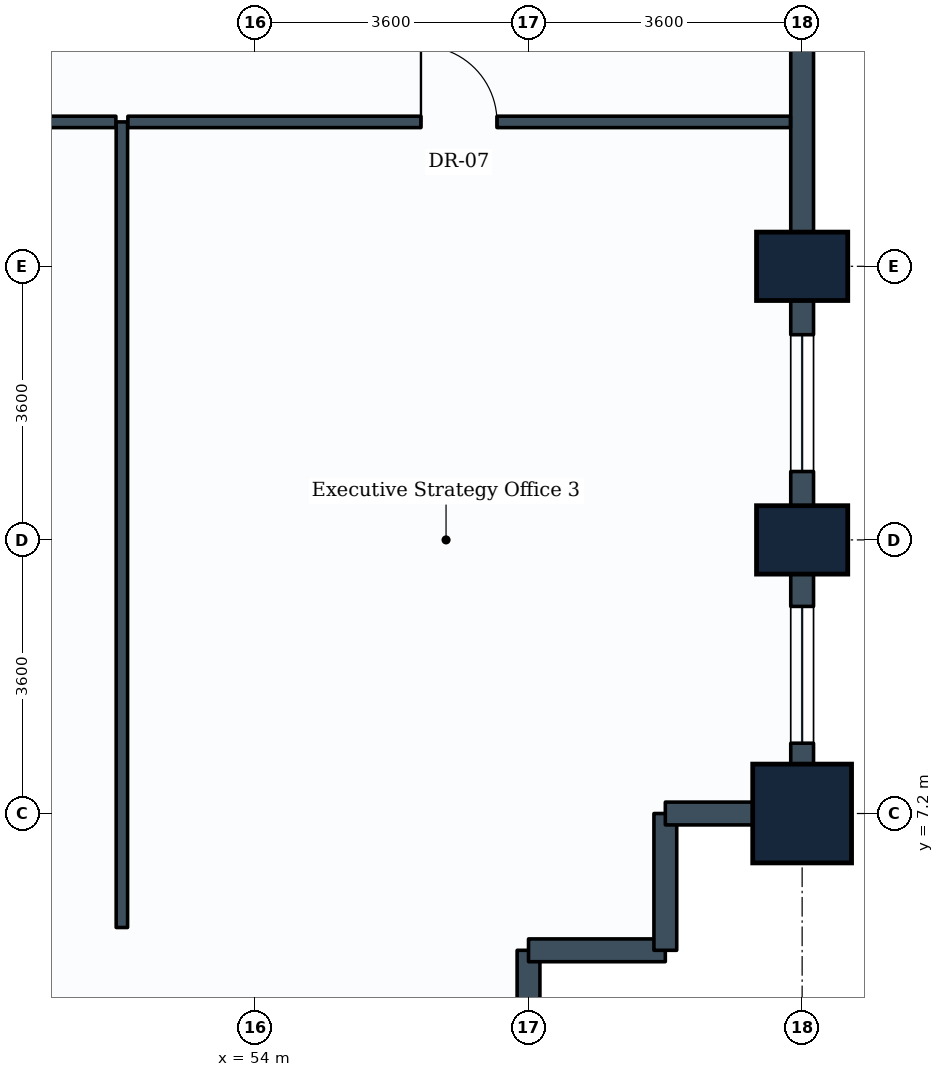
"""IFC4 building model, lengths in metres.
Left out: names, types, materials, properties, quantities, classifications, styles, units other than length and angle.
Written with IfcOpenShell. Run it as: python <this file> out.ifc"""

import sys

from ifc_helpers import new_model, si_unit, direction, frame, frame_2d, origin, origin_2d, place, context, subcontext, project, spatial, rectangle, extrude, element, fill, save


model = new_model("IFC4")
c1 = context("Model", 3, precision=1e-05, world=origin(), true_north=direction((0.0, 1.0)))
c2 = subcontext(c1, "Body", "Model", "MODEL_VIEW")
j1 = project(units=[si_unit("LENGTHUNIT", "METRE"), si_unit("PLANEANGLEUNIT", "RADIAN")], contexts=[c1])
p1 = place(None, origin())
s1 = spatial("IfcSite", under=j1, at=p1, CompositionType="ELEMENT")
p2 = place(p1, origin())
s2 = spatial("IfcBuilding", under=s1, at=p2, CompositionType="ELEMENT")
p3 = place(p2, frame((0.0, 0.0, 63.0)))
s3 = spatial("IfcBuildingStorey", under=s2, at=p3, CompositionType="ELEMENT", Elevation=63.0)
p4 = place(p3, frame((61.2, 7.2, 0.0), z_axis=(0.0, 0.0, 1.0), x_axis=(1.0, 0.0, 0.0)))
e1 = element("IfcColumn", 1, at=p4, inside=s3, PredefinedType="COLUMN", context=c2, shape_type="SweptSolid", body=[
    extrude(rectangle(XDim=1.3, YDim=1.3, at=origin_2d()), origin(), (0.0, 0.0, 1.0), 3.9),
])
for number, where, z_axis, x_axis in (
    (2, (61.2, 10.8, 0.0), (0.0, 0.0, 1.0), (0.0, 1.0, 0.0)),
    (3, (61.2, 14.4, 0.0), (0.0, 0.0, 1.0), (0.0, 1.0, 0.0)),
):
    element("IfcColumn", number, at=place(p3, frame(where, z_axis=z_axis, x_axis=x_axis)), inside=s3, PredefinedType="COLUMN", context=c2, shape_type="SweptSolid", body=[
        extrude(rectangle(XDim=0.9, YDim=1.2, at=origin_2d()), origin(), (0.0, 0.0, 1.0), 3.9),
    ])
p5 = place(p3, frame((57.6, 5.4, 0.0), z_axis=(0.0, 0.0, 1.0), x_axis=(0.0, -1.0, 0.0)))
e4 = element("IfcWall", 4, at=p5, inside=s3, PredefinedType="STANDARD", context=c2, shape_type="SweptSolid", body=[
    extrude(rectangle(XDim=1.8, YDim=0.3, at=frame_2d((0.9, 0.0))), origin(), (0.0, 0.0, 1.0), 2.93),
])
p6 = place(p3, frame((59.4, 5.4, 0.0), z_axis=(0.0, 0.0, 1.0), x_axis=(-1.0, 0.0, 0.0)))
e5 = element("IfcWall", 5, at=p6, inside=s3, PredefinedType="STANDARD", context=c2, shape_type="SweptSolid", body=[
    extrude(rectangle(XDim=1.8, YDim=0.3, at=frame_2d((0.9, 0.0))), origin(), (0.0, 0.0, 1.0), 3.635),
])
p7 = place(p3, frame((59.4, 7.2, 0.0), z_axis=(0.0, 0.0, 1.0), x_axis=(0.0, -1.0, 0.0)))
e6 = element("IfcWall", 6, at=p7, inside=s3, PredefinedType="STANDARD", context=c2, shape_type="SweptSolid", body=[
    extrude(rectangle(XDim=1.8, YDim=0.3, at=frame_2d((0.9, 0.0))), origin(), (0.0, 0.0, 1.0), 3.635),
])
p8 = place(p3, frame((61.2, 7.2, 0.0), z_axis=(0.0, 0.0, 1.0), x_axis=(-1.0, 0.0, 0.0)))
e7 = element("IfcWall", 7, at=p8, inside=s3, PredefinedType="STANDARD", context=c2, shape_type="SweptSolid", body=[
    extrude(rectangle(XDim=1.8, YDim=0.3, at=frame_2d((0.9, 0.0))), origin(), (0.0, 0.0, 1.0), 2.93),
])
p9 = place(p3, frame((61.2, 10.8, 0.0), z_axis=(0.0, 0.0, 1.0), x_axis=(0.0, -1.0, 0.0)))
e8 = element("IfcWall", 8, at=p9, inside=s3, PredefinedType="STANDARD", context=c2, shape_type="SweptSolid", body=[
    extrude(rectangle(XDim=3.6, YDim=0.3, at=frame_2d((1.8, 0.0))), origin(), (0.0, 0.0, 1.0), 2.93),
])
p10 = place(p9, frame((0.875, 0.0, 0.85)))
e9 = element("IfcOpeningElement", 9, at=p10, cuts=e8, PredefinedType="OPENING", context=c2, shape_type="SweptSolid", body=[
    extrude(rectangle(XDim=1.8, YDim=1.35, at=frame_2d((0.9, 0.675))), frame((0.0, 0.16, 0.0), z_axis=(0.0, -1.0, 0.0), x_axis=(1.0, 0.0, 0.0)), (0.0, 0.0, 1.0), 0.32),
])
p11 = place(p3, frame((61.2, 14.4, 0.0), z_axis=(0.0, 0.0, 1.0), x_axis=(0.0, -1.0, 0.0)))
e10 = element("IfcWall", 10, at=p11, inside=s3, PredefinedType="STANDARD", context=c2, shape_type="SweptSolid", body=[
    extrude(rectangle(XDim=3.6, YDim=0.3, at=frame_2d((1.8, 0.0))), origin(), (0.0, 0.0, 1.0), 2.93),
])
p12 = place(p11, frame((0.9, 0.0, 0.85)))
e11 = element("IfcOpeningElement", 11, at=p12, cuts=e10, PredefinedType="OPENING", context=c2, shape_type="SweptSolid", body=[
    extrude(rectangle(XDim=1.8, YDim=1.35, at=frame_2d((0.9, 0.675))), frame((0.0, 0.16, 0.0), z_axis=(0.0, -1.0, 0.0), x_axis=(1.0, 0.0, 0.0)), (0.0, 0.0, 1.0), 0.32),
])
p13 = place(p3, frame((61.2, 18.0, 0.0), z_axis=(0.0, 0.0, 1.0), x_axis=(0.0, -1.0, 0.0)))
e12 = element("IfcWall", 12, at=p13, inside=s3, PredefinedType="STANDARD", context=c2, shape_type="SweptSolid", body=[
    extrude(rectangle(XDim=3.6, YDim=0.3, at=frame_2d((1.8, 0.0))), origin(), (0.0, 0.0, 1.0), 2.93),
])
p14 = place(p3, frame((52.25, 5.7, 0.0), z_axis=(0.0, 0.0, 1.0), x_axis=(0.0, 1.0, 0.0)))
e13 = element("IfcWall", 13, at=p14, inside=s3, PredefinedType="PARTITIONING", context=c2, shape_type="SweptSolid", body=[
    extrude(rectangle(XDim=10.6, YDim=0.15, at=frame_2d((5.3, 0.0))), origin(), (0.0, 0.0, 1.0), 3.03),
])
p15 = place(p3, frame((41.429, 16.3, 0.0), z_axis=(0.0, 0.0, 1.0), x_axis=(1.0, 0.0, 0.0)))
e14 = element("IfcWall", 14, at=p15, inside=s3, PredefinedType="PARTITIONING", context=c2, shape_type="SweptSolid", body=[
    extrude(rectangle(XDim=10.742, YDim=0.15, at=frame_2d((5.371, 0.0))), origin(), (0.0, 0.0, 1.0), 3.04),
])
p16 = place(p15, frame((4.831, 0.0, 0.0)))
e15 = element("IfcOpeningElement", 15, at=p16, cuts=e14, PredefinedType="OPENING", context=c2, shape_type="SweptSolid", body=[
    extrude(rectangle(XDim=1.0, YDim=2.1, at=frame_2d((0.5, 1.05))), frame((0.0, 0.085, 0.0), z_axis=(0.0, -1.0, 0.0), x_axis=(1.0, 0.0, 0.0)), (0.0, 0.0, 1.0), 0.17),
])
p17 = place(p3, frame((52.329, 16.3, 0.0), z_axis=(0.0, 0.0, 1.0), x_axis=(1.0, 0.0, 0.0)))
e16 = element("IfcWall", 16, at=p17, inside=s3, PredefinedType="PARTITIONING", context=c2, shape_type="SweptSolid", body=[
    extrude(rectangle(XDim=8.717, YDim=0.15, at=frame_2d((4.358, 0.0))), origin(), (0.0, 0.0, 1.0), 2.93),
])
p18 = place(p17, frame((3.856, 0.0, 0.0)))
e17 = element("IfcOpeningElement", 17, at=p18, cuts=e16, PredefinedType="OPENING", context=c2, shape_type="SweptSolid", body=[
    extrude(rectangle(XDim=1.0, YDim=2.1, at=frame_2d((0.5, 1.05))), frame((0.0, 0.085, 0.0), z_axis=(0.0, -1.0, 0.0), x_axis=(1.0, 0.0, 0.0)), (0.0, 0.0, 1.0), 0.17),
])
p19 = place(p10, origin())
e18 = element("IfcWindow", 18, at=p19, inside=s3, PartitioningType="SINGLE_PANEL", PredefinedType="WINDOW", context=c2, shape_type="SweptSolid", body=[
    extrude(rectangle(XDim=1.8, YDim=1.35, at=frame_2d((0.9, 0.675))), frame((0.0, 0.03, 0.0), z_axis=(0.0, -1.0, 0.0), x_axis=(1.0, 0.0, 0.0)), (0.0, 0.0, 1.0), 0.06),
])
fill(e9, e18)
p20 = place(p12, origin())
e19 = element("IfcWindow", 19, at=p20, inside=s3, PartitioningType="SINGLE_PANEL", PredefinedType="WINDOW", context=c2, shape_type="SweptSolid", body=[
    extrude(rectangle(XDim=1.8, YDim=1.35, at=frame_2d((0.9, 0.675))), frame((0.0, 0.03, 0.0), z_axis=(0.0, -1.0, 0.0), x_axis=(1.0, 0.0, 0.0)), (0.0, 0.0, 1.0), 0.06),
])
fill(e11, e19)
p21 = place(p18, origin())
e20 = element("IfcDoor", 20, at=p21, inside=s3, OperationType="SINGLE_SWING_LEFT", PredefinedType="DOOR", context=c2, shape_type="SweptSolid", body=[
    extrude(rectangle(XDim=1.0, YDim=2.1, at=frame_2d((0.5, 1.05))), frame((0.0, 0.025, 0.0), z_axis=(0.0, -1.0, 0.0), x_axis=(1.0, 0.0, 0.0)), (0.0, 0.0, 1.0), 0.05),
])
fill(e17, e20)
save(model, sys.argv[1])
